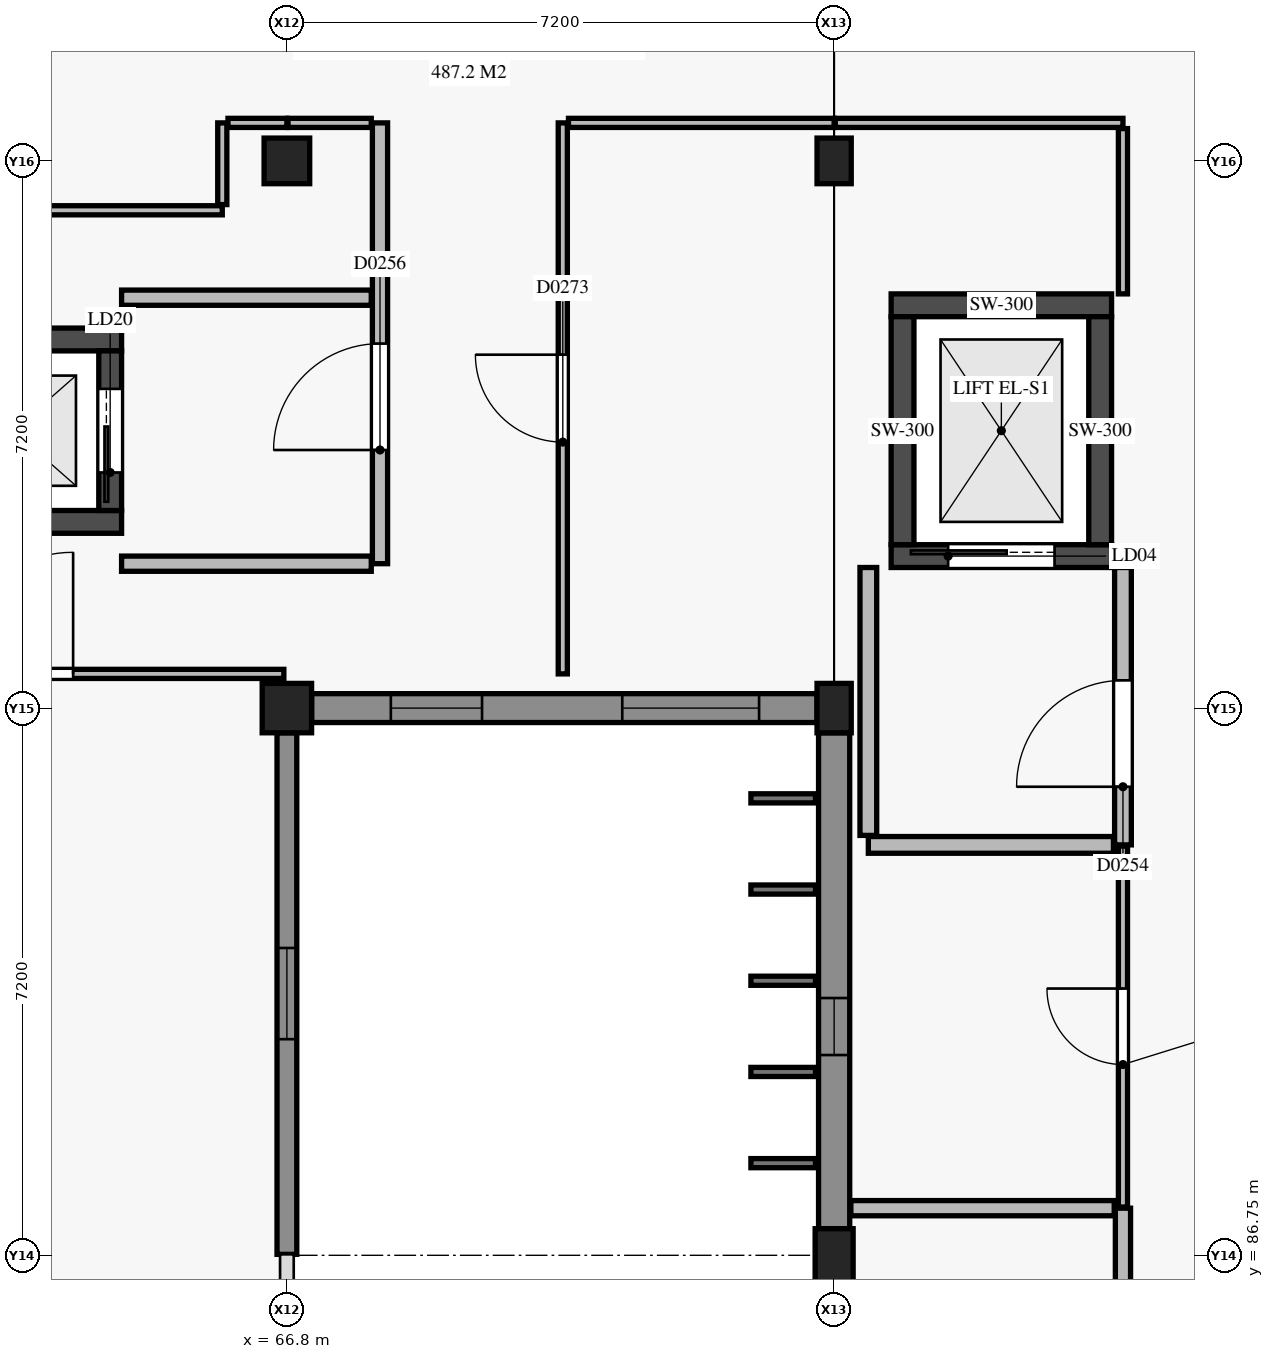
"""IFC4 building model, lengths in metres.
Left out: names, types, materials, properties, quantities, classifications, styles, units other than length and angle.
Written with IfcOpenShell. Run it as: python <this file> out.ifc"""

import sys

from ifc_helpers import new_model, si_unit, direction, frame, frame_2d, origin, origin_2d, place, context, subcontext, project, spatial, rectangle, extrude, element, fill, save


model = new_model("IFC4")
c1 = context("Model", 3, precision=1e-05, world=origin(), true_north=direction((0.0, 1.0)))
c2 = subcontext(c1, "Body", "Model", "MODEL_VIEW")
j1 = project(units=[si_unit("LENGTHUNIT", "METRE"), si_unit("PLANEANGLEUNIT", "RADIAN")], contexts=[c1])
p1 = place(None, origin())
s1 = spatial("IfcSite", under=j1, at=p1, CompositionType="ELEMENT")
p2 = place(p1, origin())
s2 = spatial("IfcBuilding", under=s1, at=p2, CompositionType="ELEMENT")
p3 = place(p2, frame((0.0, 0.0, 13.2)))
s3 = spatial("IfcBuildingStorey", under=s2, at=p3, CompositionType="ELEMENT", Elevation=13.2)
p4 = place(p3, frame((66.8, 93.95, 0.0), z_axis=(0.0, 0.0, 1.0), x_axis=(1.0, 0.0, 0.0)))
e1 = element("IfcColumn", 1, at=p4, inside=s3, PredefinedType="COLUMN", context=c2, shape_type="SweptSolid", body=[
    extrude(rectangle(XDim=0.65, YDim=0.65, at=origin_2d()), origin(), (0.0, 0.0, 1.0), 4.2),
])
p5 = place(p3, frame((66.8, 101.15, 0.0), z_axis=(0.0, 0.0, 1.0), x_axis=(1.0, 0.0, 0.0)))
e2 = element("IfcColumn", 2, at=p5, inside=s3, PredefinedType="COLUMN", context=c2, shape_type="SweptSolid", body=[
    extrude(rectangle(XDim=0.6, YDim=0.6, at=origin_2d()), origin(), (0.0, 0.0, 1.0), 4.2),
])
p6 = place(p3, frame((74.0, 86.75, 0.0), z_axis=(0.0, 0.0, 1.0), x_axis=(1.0, 0.0, 0.0)))
e3 = element("IfcColumn", 3, at=p6, inside=s3, PredefinedType="COLUMN", context=c2, shape_type="SweptSolid", body=[
    extrude(rectangle(XDim=0.5, YDim=0.7, at=origin_2d()), origin(), (0.0, 0.0, 1.0), 4.2),
])
p7 = place(p3, frame((74.0, 93.95, 0.0), z_axis=(0.0, 0.0, 1.0), x_axis=(1.0, 0.0, 0.0)))
e4 = element("IfcColumn", 4, at=p7, inside=s3, PredefinedType="COLUMN", context=c2, shape_type="SweptSolid", body=[
    extrude(rectangle(XDim=0.45, YDim=0.65, at=origin_2d()), origin(), (0.0, 0.0, 1.0), 4.2),
])
p8 = place(p3, frame((74.0, 101.15, 0.0), z_axis=(0.0, 0.0, 1.0), x_axis=(1.0, 0.0, 0.0)))
e5 = element("IfcColumn", 5, at=p8, inside=s3, PredefinedType="COLUMN", context=c2, shape_type="SweptSolid", body=[
    extrude(rectangle(XDim=0.45, YDim=0.6, at=origin_2d()), origin(), (0.0, 0.0, 1.0), 4.2),
])
p9 = place(p3, frame((74.75, 95.95, 0.0), z_axis=(0.0, 0.0, 1.0), x_axis=(1.0, 0.0, 0.0)))
e6 = element("IfcWall", 6, at=p9, inside=s3, PredefinedType="SHEAR", context=c2, shape_type="SweptSolid", body=[
    extrude(rectangle(XDim=2.9, YDim=0.3, at=frame_2d((1.45, 0.0))), origin(), (0.0, 0.0, 1.0), 3.95),
])
p10 = place(p9, frame((0.75, 0.0, 0.0)))
e7 = element("IfcOpeningElement", 7, at=p10, cuts=e6, PredefinedType="OPENING", context=c2, shape_type="SweptSolid", body=[
    extrude(rectangle(XDim=1.4, YDim=2.15, at=frame_2d((0.7, 1.075))), frame((0.0, 0.16, 0.0), z_axis=(0.0, -1.0, 0.0), x_axis=(1.0, 0.0, 0.0)), (0.0, 0.0, 1.0), 0.32),
])
p11 = place(p3, frame((74.75, 99.25, 0.0), z_axis=(0.0, 0.0, 1.0), x_axis=(1.0, 0.0, 0.0)))
e8 = element("IfcWall", 8, at=p11, inside=s3, PredefinedType="SHEAR", context=c2, shape_type="SweptSolid", body=[
    extrude(rectangle(XDim=2.9, YDim=0.3, at=frame_2d((1.45, 0.0))), origin(), (0.0, 0.0, 1.0), 3.95),
])
for number, where, z_axis, x_axis in (
    (9, (74.9, 96.1, 0.0), (0.0, 0.0, 1.0), (0.0, 1.0, 0.0)),
    (10, (77.5, 96.1, 0.0), (0.0, 0.0, 1.0), (0.0, 1.0, 0.0)),
):
    element("IfcWall", number, at=place(p3, frame(where, z_axis=z_axis, x_axis=x_axis)), inside=s3, PredefinedType="SHEAR", context=c2, shape_type="SweptSolid", body=[
        extrude(rectangle(XDim=3.0, YDim=0.3, at=frame_2d((1.5, 0.0))), origin(), (0.0, 0.0, 1.0), 3.95),
    ])
for number, where, z_axis, x_axis in (
    (11, (61.775, 96.4, 0.0), (0.0, 0.0, 1.0), (1.0, 0.0, 0.0)),
    (12, (61.775, 98.8, 0.0), (0.0, 0.0, 1.0), (1.0, 0.0, 0.0)),
):
    element("IfcWall", number, at=place(p3, frame(where, z_axis=z_axis, x_axis=x_axis)), inside=s3, PredefinedType="SHEAR", context=c2, shape_type="SweptSolid", body=[
        extrude(rectangle(XDim=2.85, YDim=0.3, at=frame_2d((1.425, 0.0))), origin(), (0.0, 0.0, 1.0), 3.95),
    ])
p12 = place(p3, frame((64.475, 96.55, 0.0), z_axis=(0.0, 0.0, 1.0), x_axis=(0.0, 1.0, 0.0)))
e13 = element("IfcWall", 13, at=p12, inside=s3, PredefinedType="SHEAR", context=c2, shape_type="SweptSolid", body=[
    extrude(rectangle(XDim=2.1, YDim=0.3, at=frame_2d((1.05, 0.0))), origin(), (0.0, 0.0, 1.0), 3.95),
])
p13 = place(p12, frame((0.5, 0.0, 0.0)))
e14 = element("IfcOpeningElement", 14, at=p13, cuts=e13, PredefinedType="OPENING", context=c2, shape_type="SweptSolid", body=[
    extrude(rectangle(XDim=1.1, YDim=2.15, at=frame_2d((0.55, 1.075))), frame((0.0, 0.16, 0.0), z_axis=(0.0, -1.0, 0.0), x_axis=(1.0, 0.0, 0.0)), (0.0, 0.0, 1.0), 0.32),
])
p14 = place(p3, frame((74.0, 87.1, 0.0), z_axis=(0.0, 0.0, 1.0), x_axis=(0.0, 1.0, 0.0)))
e15 = element("IfcWall", 15, at=p14, inside=s3, PredefinedType="USERDEFINED", context=c2, shape_type="SweptSolid", body=[
    extrude(rectangle(XDim=6.525, YDim=0.41, at=frame_2d((3.262, 0.0))), origin(), (0.0, 0.0, 1.0), 3.13),
])
p15 = place(p14, frame((2.285, 0.0, 0.9)))
e16 = element("IfcOpeningElement", 16, at=p15, cuts=e15, PredefinedType="OPENING", context=c2, shape_type="SweptSolid", body=[
    extrude(rectangle(XDim=0.75, YDim=1.8, at=frame_2d((0.375, 0.9))), frame((0.0, 0.215, 0.0), z_axis=(0.0, -1.0, 0.0), x_axis=(1.0, 0.0, 0.0)), (0.0, 0.0, 1.0), 0.43),
])
p16 = place(p3, frame((73.775, 93.95, 0.0), z_axis=(0.0, 0.0, 1.0), x_axis=(-1.0, 0.0, 0.0)))
e17 = element("IfcWall", 17, at=p16, inside=s3, PredefinedType="USERDEFINED", context=c2, shape_type="SweptSolid", body=[
    extrude(rectangle(XDim=6.65, YDim=0.38, at=frame_2d((3.325, 0.0))), origin(), (0.0, 0.0, 1.0), 3.13),
])
p17 = place(p16, frame((0.762, 0.0, 0.9)))
e18 = element("IfcOpeningElement", 18, at=p17, cuts=e17, PredefinedType="OPENING", context=c2, shape_type="SweptSolid", body=[
    extrude(rectangle(XDim=1.8, YDim=1.5, at=frame_2d((0.9, 0.75))), frame((0.0, 0.2, 0.0), z_axis=(0.0, -1.0, 0.0), x_axis=(1.0, 0.0, 0.0)), (0.0, 0.0, 1.0), 0.4),
])
p18 = place(p16, frame((4.407, 0.0, 0.6)))
e19 = element("IfcOpeningElement", 19, at=p18, cuts=e17, PredefinedType="OPENING", context=c2, shape_type="SweptSolid", body=[
    extrude(rectangle(XDim=1.2, YDim=2.2, at=frame_2d((0.6, 1.1))), frame((0.0, 0.2, 0.0), z_axis=(0.0, -1.0, 0.0), x_axis=(1.0, 0.0, 0.0)), (0.0, 0.0, 1.0), 0.4),
])
p19 = place(p3, frame((66.8, 93.625, 0.0), z_axis=(0.0, 0.0, 1.0), x_axis=(0.0, -1.0, 0.0)))
e20 = element("IfcWall", 20, at=p19, inside=s3, PredefinedType="SOLIDWALL", context=c2, shape_type="SweptSolid", body=[
    extrude(rectangle(XDim=6.863, YDim=0.26, at=frame_2d((3.431, 0.0))), origin(), (0.0, 0.0, 1.0), 3.13),
])
p20 = place(p19, frame((2.831, 0.0, 0.9)))
e21 = element("IfcOpeningElement", 21, at=p20, cuts=e20, PredefinedType="OPENING", context=c2, shape_type="SweptSolid", body=[
    extrude(rectangle(XDim=1.2, YDim=1.8, at=frame_2d((0.6, 0.9))), frame((0.0, 0.14, 0.0), z_axis=(0.0, -1.0, 0.0), x_axis=(1.0, 0.0, 0.0)), (0.0, 0.0, 1.0), 0.28),
])
p21 = place(p3, frame((77.8, 92.15, 0.0), z_axis=(0.0, 0.0, 1.0), x_axis=(0.0, 1.0, 0.0)))
e22 = element("IfcWall", 22, at=p21, inside=s3, PredefinedType="PARTITIONING", context=c2, shape_type="SweptSolid", body=[
    extrude(rectangle(XDim=3.65, YDim=0.22, at=frame_2d((1.825, 0.0))), origin(), (0.0, 0.0, 1.0), 3.285),
])
p22 = place(p21, frame((0.765, 0.0, 0.0)))
e23 = element("IfcOpeningElement", 23, at=p22, cuts=e22, PredefinedType="OPENING", context=c2, shape_type="SweptSolid", body=[
    extrude(rectangle(XDim=1.4, YDim=2.2, at=frame_2d((0.7, 1.1))), frame((0.0, 0.12, 0.0), z_axis=(0.0, -1.0, 0.0), x_axis=(1.0, 0.0, 0.0)), (0.0, 0.0, 1.0), 0.24),
])
p23 = place(p3, frame((68.025, 95.85, 0.0), z_axis=(0.0, 0.0, 1.0), x_axis=(0.0, 1.0, 0.0)))
e24 = element("IfcWall", 24, at=p23, inside=s3, PredefinedType="PARTITIONING", context=c2, shape_type="SweptSolid", body=[
    extrude(rectangle(XDim=5.8, YDim=0.2, at=frame_2d((2.9, 0.0))), origin(), (0.0, 0.0, 1.0), 3.415),
])
p24 = place(p23, frame((1.496, 0.0, 0.0)))
e25 = element("IfcOpeningElement", 25, at=p24, cuts=e24, PredefinedType="OPENING", context=c2, shape_type="SweptSolid", body=[
    extrude(rectangle(XDim=1.4, YDim=2.2, at=frame_2d((0.7, 1.1))), frame((0.0, 0.11, 0.0), z_axis=(0.0, -1.0, 0.0), x_axis=(1.0, 0.0, 0.0)), (0.0, 0.0, 1.0), 0.22),
])
p25 = place(p3, frame((64.625, 95.85, 0.0), z_axis=(0.0, 0.0, 1.0), x_axis=(1.0, 0.0, 0.0)))
e26 = element("IfcWall", 26, at=p25, inside=s3, PredefinedType="PARTITIONING", context=c2, shape_type="SweptSolid", body=[
    extrude(rectangle(XDim=3.285, YDim=0.2, at=frame_2d((1.643, 0.0))), origin(), (0.0, 0.0, 1.0), 3.235),
])
p26 = place(p3, frame((74.45, 92.15, 0.0), z_axis=(0.0, 0.0, 1.0), x_axis=(1.0, 0.0, 0.0)))
e27 = element("IfcWall", 27, at=p26, inside=s3, PredefinedType="PARTITIONING", context=c2, shape_type="SweptSolid", body=[
    extrude(rectangle(XDim=3.225, YDim=0.22, at=frame_2d((1.613, 0.0))), origin(), (0.0, 0.0, 1.0), 3.95),
])
p27 = place(p3, frame((74.45, 92.275, 0.0), z_axis=(0.0, 0.0, 1.0), x_axis=(0.0, 1.0, 0.0)))
e28 = element("IfcWall", 28, at=p27, inside=s3, PredefinedType="PARTITIONING", context=c2, shape_type="SweptSolid", body=[
    extrude(rectangle(XDim=3.525, YDim=0.22, at=frame_2d((1.763, 0.0))), origin(), (0.0, 0.0, 1.0), 3.285),
])
p28 = place(p3, frame((64.625, 99.35, 0.0), z_axis=(0.0, 0.0, 1.0), x_axis=(1.0, 0.0, 0.0)))
e29 = element("IfcWall", 29, at=p28, inside=s3, PredefinedType="PARTITIONING", context=c2, shape_type="SweptSolid", body=[
    extrude(rectangle(XDim=3.285, YDim=0.2, at=frame_2d((1.643, 0.0))), origin(), (0.0, 0.0, 1.0), 3.235),
])
p29 = place(p3, frame((77.8, 74.55, 0.0), z_axis=(0.0, 0.0, 1.0), x_axis=(0.0, 1.0, 0.0)))
e30 = element("IfcWall", 30, at=p29, inside=s3, PredefinedType="PARTITIONING", context=c2, shape_type="SweptSolid", body=[
    extrude(rectangle(XDim=12.82, YDim=0.2, at=frame_2d((6.41, 0.0))), origin(), (0.0, 0.0, 1.0), 3.285),
])
p30 = place(p29, frame((5.91, 0.0, 0.0)))
e31 = element("IfcOpeningElement", 31, at=p30, cuts=e30, PredefinedType="OPENING", context=c2, shape_type="SweptSolid", body=[
    extrude(rectangle(XDim=1.0, YDim=2.15, at=frame_2d((0.5, 1.075))), frame((0.0, 0.11, 0.0), z_axis=(0.0, -1.0, 0.0), x_axis=(1.0, 0.0, 0.0)), (0.0, 0.0, 1.0), 0.22),
])
p31 = place(p3, frame((59.615, 94.4, 0.0), z_axis=(0.0, 0.0, 1.0), x_axis=(1.0, 0.0, 0.0)))
e32 = element("IfcWall", 32, at=p31, inside=s3, PredefinedType="PARTITIONING", context=c2, shape_type="SweptSolid", body=[
    extrude(rectangle(XDim=7.145, YDim=0.12, at=frame_2d((3.573, 0.0))), origin(), (0.0, 0.0, 1.0), 3.135),
])
p32 = place(p31, frame((2.772, 0.0, 0.0)))
e33 = element("IfcOpeningElement", 33, at=p32, cuts=e32, PredefinedType="OPENING", context=c2, shape_type="SweptSolid", body=[
    extrude(rectangle(XDim=1.6, YDim=2.25, at=frame_2d((0.8, 1.125))), frame((0.0, 0.07, 0.0), z_axis=(0.0, -1.0, 0.0), x_axis=(1.0, 0.0, 0.0)), (0.0, 0.0, 1.0), 0.14),
])
p33 = place(p3, frame((77.8, 87.385, 0.0), z_axis=(0.0, 0.0, 1.0), x_axis=(0.0, 1.0, 0.0)))
e34 = element("IfcWall", 34, at=p33, inside=s3, PredefinedType="PARTITIONING", context=c2, shape_type="SweptSolid", body=[
    extrude(rectangle(XDim=4.75, YDim=0.12, at=frame_2d((2.375, 0.0))), origin(), (0.0, 0.0, 1.0), 3.475),
])
p34 = place(p33, frame((1.875, 0.0, 0.0)))
e35 = element("IfcOpeningElement", 35, at=p34, cuts=e34, PredefinedType="OPENING", context=c2, shape_type="SweptSolid", body=[
    extrude(rectangle(XDim=1.0, YDim=2.15, at=frame_2d((0.5, 1.075))), frame((0.0, 0.07, 0.0), z_axis=(0.0, -1.0, 0.0), x_axis=(1.0, 0.0, 0.0)), (0.0, 0.0, 1.0), 0.14),
])
p35 = place(p3, frame((70.43, 94.4, 0.0), z_axis=(0.0, 0.0, 1.0), x_axis=(0.0, 1.0, 0.0)))
e36 = element("IfcWall", 36, at=p35, inside=s3, PredefinedType="PARTITIONING", context=c2, shape_type="SweptSolid", body=[
    extrude(rectangle(XDim=7.25, YDim=0.12, at=frame_2d((3.625, 0.0))), origin(), (0.0, 0.0, 1.0), 3.415),
])
p36 = place(p35, frame((3.05, 0.0, 0.0)))
e37 = element("IfcOpeningElement", 37, at=p36, cuts=e36, PredefinedType="OPENING", context=c2, shape_type="SweptSolid", body=[
    extrude(rectangle(XDim=1.15, YDim=2.15, at=frame_2d((0.575, 1.075))), frame((0.0, 0.07, 0.0), z_axis=(0.0, -1.0, 0.0), x_axis=(1.0, 0.0, 0.0)), (0.0, 0.0, 1.0), 0.14),
])
p37 = place(p3, frame((70.505, 101.65, 0.0), z_axis=(0.0, 0.0, 1.0), x_axis=(1.0, 0.0, 0.0)))
e38 = element("IfcWall", 38, at=p37, inside=s3, PredefinedType="PARTITIONING", context=c2, shape_type="SweptSolid", body=[
    extrude(rectangle(XDim=3.495, YDim=0.12, at=frame_2d((1.748, 0.0))), origin(), (0.0, 0.0, 1.0), 3.455),
])
p38 = place(p3, frame((74.015, 101.65, 0.0), z_axis=(0.0, 0.0, 1.0), x_axis=(1.0, 0.0, 0.0)))
e39 = element("IfcWall", 39, at=p38, inside=s3, PredefinedType="PARTITIONING", context=c2, shape_type="SweptSolid", body=[
    extrude(rectangle(XDim=3.785, YDim=0.12, at=frame_2d((1.893, 0.0))), origin(), (0.0, 0.0, 1.0), 3.455),
])
p39 = place(p3, frame((77.8, 99.4, 0.0), z_axis=(0.0, 0.0, 1.0), x_axis=(0.0, 1.0, 0.0)))
e40 = element("IfcWall", 40, at=p39, inside=s3, PredefinedType="PARTITIONING", context=c2, shape_type="SweptSolid", body=[
    extrude(rectangle(XDim=2.175, YDim=0.12, at=frame_2d((1.087, 0.0))), origin(), (0.0, 0.0, 1.0), 3.455),
])
p40 = place(p3, frame((63.665, 100.5, 0.0), z_axis=(0.0, 0.0, 1.0), x_axis=(1.0, 0.0, 0.0)))
e41 = element("IfcWall", 41, at=p40, inside=s3, PredefinedType="PARTITIONING", context=c2, shape_type="SweptSolid", body=[
    extrude(rectangle(XDim=2.285, YDim=0.12, at=frame_2d((1.143, 0.0))), origin(), (0.0, 0.0, 1.0), 3.95),
])
p41 = place(p3, frame((65.95, 100.575, 0.0), z_axis=(0.0, 0.0, 1.0), x_axis=(0.0, 1.0, 0.0)))
e42 = element("IfcWall", 42, at=p41, inside=s3, PredefinedType="PARTITIONING", context=c2, shape_type="SweptSolid", body=[
    extrude(rectangle(XDim=1.075, YDim=0.12, at=frame_2d((0.538, 0.0))), origin(), (0.0, 0.0, 1.0), 3.95),
])
p42 = place(p3, frame((66.025, 101.65, 0.0), z_axis=(0.0, 0.0, 1.0), x_axis=(1.0, 0.0, 0.0)))
e43 = element("IfcWall", 43, at=p42, inside=s3, PredefinedType="PARTITIONING", context=c2, shape_type="SweptSolid", body=[
    extrude(rectangle(XDim=0.775, YDim=0.12, at=frame_2d((0.388, 0.0))), origin(), (0.0, 0.0, 1.0), 3.355),
])
p43 = place(p3, frame((66.815, 101.65, 0.0), z_axis=(0.0, 0.0, 1.0), x_axis=(1.0, 0.0, 0.0)))
e44 = element("IfcWall", 44, at=p43, inside=s3, PredefinedType="PARTITIONING", context=c2, shape_type="SweptSolid", body=[
    extrude(rectangle(XDim=1.095, YDim=0.12, at=frame_2d((0.547, 0.0))), origin(), (0.0, 0.0, 1.0), 3.355),
])
p44 = place(p3, frame((74.22, 87.37, 0.0), z_axis=(0.0, 0.0, 1.0), x_axis=(1.0, 0.0, 0.0)))
e45 = element("IfcWall", 45, at=p44, inside=s3, PredefinedType="PARTITIONING", context=c2, shape_type="SweptSolid", body=[
    extrude(rectangle(XDim=3.465, YDim=0.2, at=frame_2d((1.732, 0.0))), origin(), (0.0, 0.0, 1.0), 3.95),
])
p45 = place(p15, origin())
e46 = element("IfcWindow", 46, at=p45, inside=s3, PartitioningType="SINGLE_PANEL", PredefinedType="WINDOW", context=c2, shape_type="SweptSolid", body=[
    extrude(rectangle(XDim=0.75, YDim=1.8, at=frame_2d((0.375, 0.9))), frame((0.0, 0.03, 0.0), z_axis=(0.0, -1.0, 0.0), x_axis=(1.0, 0.0, 0.0)), (0.0, 0.0, 1.0), 0.06),
])
fill(e16, e46)
p46 = place(p17, origin())
e47 = element("IfcWindow", 47, at=p46, inside=s3, PartitioningType="SINGLE_PANEL", PredefinedType="WINDOW", context=c2, shape_type="SweptSolid", body=[
    extrude(rectangle(XDim=1.8, YDim=1.5, at=frame_2d((0.9, 0.75))), frame((0.0, 0.03, 0.0), z_axis=(0.0, -1.0, 0.0), x_axis=(1.0, 0.0, 0.0)), (0.0, 0.0, 1.0), 0.06),
])
fill(e18, e47)
p47 = place(p18, origin())
e48 = element("IfcWindow", 48, at=p47, inside=s3, PartitioningType="SINGLE_PANEL", PredefinedType="WINDOW", context=c2, shape_type="SweptSolid", body=[
    extrude(rectangle(XDim=1.2, YDim=2.2, at=frame_2d((0.6, 1.1))), frame((0.0, 0.03, 0.0), z_axis=(0.0, -1.0, 0.0), x_axis=(1.0, 0.0, 0.0)), (0.0, 0.0, 1.0), 0.06),
])
fill(e19, e48)
p48 = place(p20, origin())
e49 = element("IfcWindow", 49, at=p48, inside=s3, PartitioningType="SINGLE_PANEL", PredefinedType="WINDOW", context=c2, shape_type="SweptSolid", body=[
    extrude(rectangle(XDim=1.2, YDim=1.8, at=frame_2d((0.6, 0.9))), frame((0.0, 0.03, 0.0), z_axis=(0.0, -1.0, 0.0), x_axis=(1.0, 0.0, 0.0)), (0.0, 0.0, 1.0), 0.06),
])
fill(e21, e49)
p49 = place(p10, origin())
e50 = element("IfcDoor", 50, at=p49, inside=s3, OperationType="SLIDING_TO_LEFT", PredefinedType="DOOR", context=c2, shape_type="SweptSolid", body=[
    extrude(rectangle(XDim=1.4, YDim=2.15, at=frame_2d((0.7, 1.075))), frame((0.0, 0.025, 0.0), z_axis=(0.0, -1.0, 0.0), x_axis=(1.0, 0.0, 0.0)), (0.0, 0.0, 1.0), 0.05),
])
fill(e7, e50)
p50 = place(p13, origin())
e51 = element("IfcDoor", 51, at=p50, inside=s3, OperationType="SLIDING_TO_LEFT", PredefinedType="DOOR", context=c2, shape_type="SweptSolid", body=[
    extrude(rectangle(XDim=1.1, YDim=2.15, at=frame_2d((0.55, 1.075))), frame((0.0, 0.025, 0.0), z_axis=(0.0, -1.0, 0.0), x_axis=(1.0, 0.0, 0.0)), (0.0, 0.0, 1.0), 0.05),
])
fill(e14, e51)
p51 = place(p22, origin())
e52 = element("IfcDoor", 52, at=p51, inside=s3, OperationType="SINGLE_SWING_LEFT", PredefinedType="DOOR", context=c2, shape_type="SweptSolid", body=[
    extrude(rectangle(XDim=1.4, YDim=2.2, at=frame_2d((0.7, 1.1))), frame((0.0, 0.025, 0.0), z_axis=(0.0, -1.0, 0.0), x_axis=(1.0, 0.0, 0.0)), (0.0, 0.0, 1.0), 0.05),
])
fill(e23, e52)
p52 = place(p24, origin())
e53 = element("IfcDoor", 53, at=p52, inside=s3, OperationType="SINGLE_SWING_LEFT", PredefinedType="DOOR", context=c2, shape_type="SweptSolid", body=[
    extrude(rectangle(XDim=1.4, YDim=2.2, at=frame_2d((0.7, 1.1))), frame((0.0, 0.025, 0.0), z_axis=(0.0, -1.0, 0.0), x_axis=(1.0, 0.0, 0.0)), (0.0, 0.0, 1.0), 0.05),
])
fill(e25, e53)
p53 = place(p32, origin())
e54 = element("IfcDoor", 54, at=p53, inside=s3, OperationType="SINGLE_SWING_RIGHT", PredefinedType="DOOR", context=c2, shape_type="SweptSolid", body=[
    extrude(rectangle(XDim=1.6, YDim=2.25, at=frame_2d((0.8, 1.125))), frame((0.0, 0.025, 0.0), z_axis=(0.0, -1.0, 0.0), x_axis=(1.0, 0.0, 0.0)), (0.0, 0.0, 1.0), 0.05),
])
fill(e33, e54)
p54 = place(p34, origin())
e55 = element("IfcDoor", 55, at=p54, inside=s3, OperationType="SINGLE_SWING_RIGHT", PredefinedType="DOOR", context=c2, shape_type="SweptSolid", body=[
    extrude(rectangle(XDim=1.0, YDim=2.15, at=frame_2d((0.5, 1.075))), frame((0.0, 0.025, 0.0), z_axis=(0.0, -1.0, 0.0), x_axis=(1.0, 0.0, 0.0)), (0.0, 0.0, 1.0), 0.05),
])
fill(e35, e55)
p55 = place(p36, origin())
e56 = element("IfcDoor", 56, at=p55, inside=s3, OperationType="SINGLE_SWING_RIGHT", PredefinedType="DOOR", context=c2, shape_type="SweptSolid", body=[
    extrude(rectangle(XDim=1.15, YDim=2.15, at=frame_2d((0.575, 1.075))), frame((0.0, 0.025, 0.0), z_axis=(0.0, -1.0, 0.0), x_axis=(1.0, 0.0, 0.0)), (0.0, 0.0, 1.0), 0.05),
])
fill(e37, e56)
save(model, sys.argv[1])
